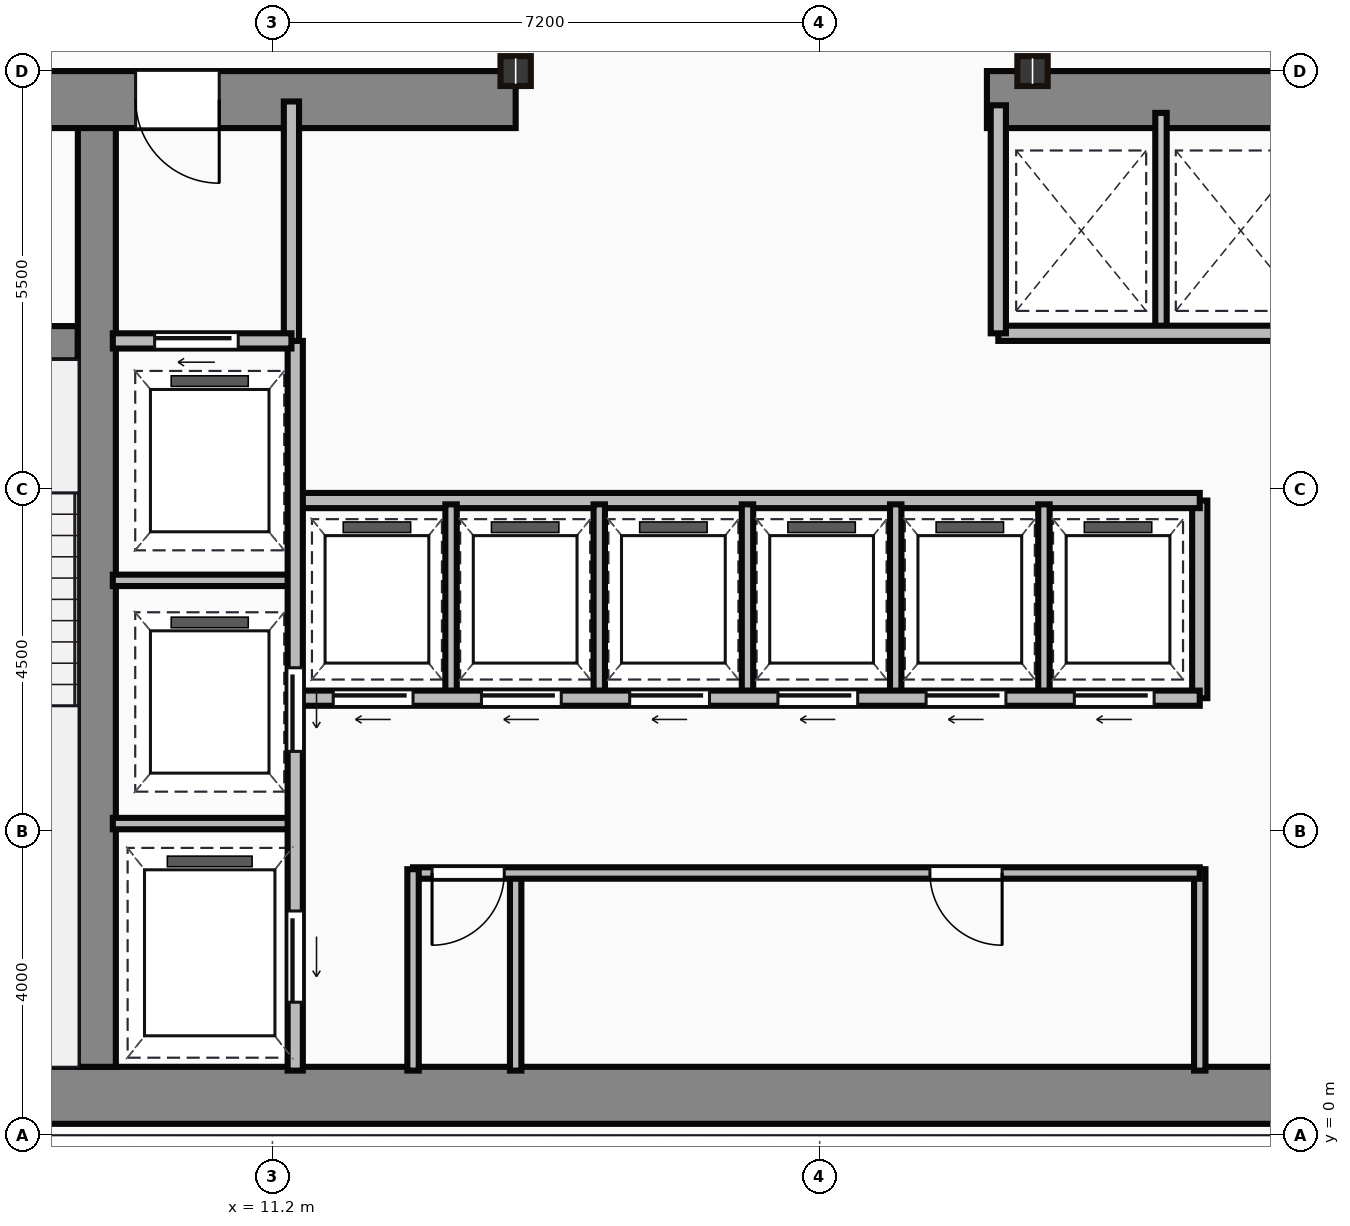
"""IFC4 building model, lengths in metres.
Left out: names, types, materials, properties, quantities, classifications, styles, units other than length and angle.
Written with IfcOpenShell. Run it as: python <this file> out.ifc"""

import sys

from ifc_helpers import new_model, si_unit, direction, frame, frame_2d, origin, origin_2d, place, context, subcontext, project, spatial, rectangle, i_section, extrude, source, transform, mapped, element, fill, save


model = new_model("IFC4")
c1 = context("Model", 3, precision=1e-05, world=origin(), true_north=direction((0.0, 1.0)))
c2 = subcontext(c1, "Body", "Model", "MODEL_VIEW")
j1 = project(units=[si_unit("LENGTHUNIT", "METRE"), si_unit("PLANEANGLEUNIT", "RADIAN")], contexts=[c1])
p1 = place(None, origin())
s1 = spatial("IfcSite", under=j1, at=p1, CompositionType="ELEMENT")
p2 = place(p1, origin())
s2 = spatial("IfcBuilding", under=s1, at=p2, CompositionType="ELEMENT")
p3 = place(p2, frame((0.0, 0.0, 103.25)))
s3 = spatial("IfcBuildingStorey", under=s2, at=p3, CompositionType="ELEMENT", Elevation=103.25)
m1 = source(origin(), c2, "Body", "SweptSolid", [
    extrude(rectangle(XDim=29.5, YDim=0.75, at=frame_2d((14.75, 0.0))), origin(), (0.0, 0.0, 1.0), 3.65),
])
p4 = place(p3, frame((4.5, 0.525, 0.0), z_axis=(0.0, 0.0, 1.0), x_axis=(1.0, 0.0, 0.0)))
e1 = element("IfcWall", 1, at=p4, inside=s3, PredefinedType="SHEAR", context=c2, shape_type="MappedRepresentation", body=[
    mapped(m1, transform((0.0, 0.0, 0.0))),
])
m2 = source(origin(), c2, "Body", "SweptSolid", [
    extrude(rectangle(XDim=9.1, YDim=0.75, at=frame_2d((4.55, 0.0))), origin(), (0.0, 0.0, 1.0), 3.65),
])
p5 = place(p3, frame((5.3, 13.625, 0.0), z_axis=(0.0, 0.0, 1.0), x_axis=(1.0, 0.0, 0.0)))
e2 = element("IfcWall", 2, at=p5, inside=s3, PredefinedType="SHEAR", context=c2, shape_type="MappedRepresentation", body=[
    mapped(m2, transform((0.0, 0.0, 0.0))),
])
p6 = place(p5, frame((4.1, 0.0, 0.0)))
e3 = element("IfcOpeningElement", 3, at=p6, cuts=e2, PredefinedType="OPENING", context=c2, shape_type="SweptSolid", body=[
    extrude(rectangle(XDim=1.1, YDim=2.15, at=frame_2d((0.55, 1.075))), frame((0.0, 0.385, 0.0), z_axis=(0.0, -1.0, 0.0), x_axis=(1.0, 0.0, 0.0)), (0.0, 0.0, 1.0), 0.77),
])
m3 = source(origin(), c2, "Body", "SweptSolid", [
    extrude(rectangle(XDim=12.6, YDim=0.75, at=frame_2d((6.3, 0.0))), origin(), (0.0, 0.0, 1.0), 3.65),
])
p7 = place(p3, frame((20.6, 13.625, 0.0), z_axis=(0.0, 0.0, 1.0), x_axis=(1.0, 0.0, 0.0)))
e4 = element("IfcWall", 4, at=p7, inside=s3, PredefinedType="SHEAR", context=c2, shape_type="MappedRepresentation", body=[
    mapped(m3, transform((0.0, 0.0, 0.0))),
])
p8 = place(p7, frame((9.25, 0.0, 0.0)))
e5 = element("IfcOpeningElement", 5, at=p8, cuts=e4, PredefinedType="OPENING", context=c2, shape_type="SweptSolid", body=[
    extrude(rectangle(XDim=1.1, YDim=2.15, at=frame_2d((0.55, 1.075))), frame((0.0, 0.385, 0.0), z_axis=(0.0, -1.0, 0.0), x_axis=(1.0, 0.0, 0.0)), (0.0, 0.0, 1.0), 0.77),
])
m4 = source(origin(), c2, "Body", "SweptSolid", [
    extrude(rectangle(XDim=12.35, YDim=0.5, at=frame_2d((6.175, 0.0))), origin(), (0.0, 0.0, 1.0), 3.65),
])
p9 = place(p3, frame((8.89, 0.9, 0.0), z_axis=(0.0, 0.0, 1.0), x_axis=(0.0, 1.0, 0.0)))
e6 = element("IfcWall", 6, at=p9, inside=s3, PredefinedType="SHEAR", context=c2, shape_type="MappedRepresentation", body=[
    mapped(m4, transform((0.0, 0.0, 0.0))),
])
m5 = source(origin(), c2, "Body", "SweptSolid", [
    extrude(rectangle(XDim=3.39, YDim=0.45, at=frame_2d((1.695, 0.0))), origin(), (0.0, 0.0, 1.0), 3.65),
])
p10 = place(p3, frame((5.25, 10.42, 0.0), z_axis=(0.0, 0.0, 1.0), x_axis=(1.0, 0.0, 0.0)))
e7 = element("IfcWall", 7, at=p10, inside=s3, PredefinedType="SHEAR", context=c2, shape_type="MappedRepresentation", body=[
    mapped(m5, transform((0.0, 0.0, 0.0))),
])
p11 = place(p10, frame((1.05, 0.0, 0.0)))
e8 = element("IfcOpeningElement", 8, at=p11, cuts=e7, PredefinedType="OPENING", context=c2, shape_type="SweptSolid", body=[
    extrude(rectangle(XDim=1.1, YDim=2.15, at=frame_2d((0.55, 1.075))), frame((0.0, 0.235, 0.0), z_axis=(0.0, -1.0, 0.0), x_axis=(1.0, 0.0, 0.0)), (0.0, 0.0, 1.0), 0.47),
])
m6 = source(origin(), c2, "Body", "SweptSolid", [
    extrude(i_section(OverallWidth=0.399, OverallDepth=0.393, WebThickness=0.023, FlangeThickness=0.037, at=origin_2d()), origin(), (0.0, 0.0, 1.0), 3.65),
])
for number, where, z_axis, x_axis in (
    (9, (14.4, 14.0, 0.0), (0.0, 0.0, 1.0), (1.0, 0.0, 0.0)),
    (10, (21.2, 14.0, 0.0), (0.0, 0.0, 1.0), (1.0, 0.0, 0.0)),
):
    element("IfcColumn", number, at=place(p3, frame(where, z_axis=z_axis, x_axis=x_axis)), inside=s3, PredefinedType="COLUMN", context=c2, shape_type="MappedRepresentation", body=[
        mapped(m6, transform((0.0, 0.0, 0.0))),
    ])
m7 = source(origin(), c2, "Body", "SweptSolid", [
    extrude(rectangle(XDim=3.18, YDim=0.2, at=frame_2d((1.59, 0.0))), origin(), (0.0, 0.0, 1.0), 3.4),
])
p12 = place(p3, frame((11.45, 10.42, 0.0), z_axis=(0.0, 0.0, 1.0), x_axis=(0.0, 1.0, 0.0)))
e11 = element("IfcWall", 11, at=p12, inside=s3, PredefinedType="PARTITIONING", context=c2, shape_type="MappedRepresentation", body=[
    mapped(m7, transform((0.0, 0.0, 0.0))),
])
m8 = source(origin(), c2, "Body", "SweptSolid", [
    extrude(rectangle(XDim=2.35, YDim=0.2, at=frame_2d((1.175, 0.0))), origin(), (0.0, 0.0, 1.0), 3.4),
])
p13 = place(p3, frame((9.1, 10.45, 0.0), z_axis=(0.0, 0.0, 1.0), x_axis=(1.0, 0.0, 0.0)))
e12 = element("IfcWall", 12, at=p13, inside=s3, PredefinedType="PARTITIONING", context=c2, shape_type="MappedRepresentation", body=[
    mapped(m8, transform((0.0, 0.0, 0.0))),
])
p14 = place(p13, frame((0.55, 0.0, 0.0)))
e13 = element("IfcOpeningElement", 13, at=p14, cuts=e12, PredefinedType="OPENING", context=c2, shape_type="SweptSolid", body=[
    extrude(rectangle(XDim=1.1, YDim=2.15, at=frame_2d((0.55, 1.075))), frame((0.0, 0.11, 0.0), z_axis=(0.0, -1.0, 0.0), x_axis=(1.0, 0.0, 0.0)), (0.0, 0.0, 1.0), 0.22),
])
m9 = source(origin(), c2, "Body", "SweptSolid", [
    extrude(rectangle(XDim=9.6, YDim=0.2, at=frame_2d((4.8, 0.0))), origin(), (0.0, 0.0, 1.0), 3.4),
])
p15 = place(p3, frame((11.5, 0.85, 0.0), z_axis=(0.0, 0.0, 1.0), x_axis=(0.0, 1.0, 0.0)))
e14 = element("IfcWall", 14, at=p15, inside=s3, PredefinedType="PARTITIONING", context=c2, shape_type="MappedRepresentation", body=[
    mapped(m9, transform((0.0, 0.0, 0.0))),
])
p16 = place(p15, frame((4.2, 0.0, 0.0)))
e15 = element("IfcOpeningElement", 15, at=p16, cuts=e14, PredefinedType="OPENING", context=c2, shape_type="SweptSolid", body=[
    extrude(rectangle(XDim=1.1, YDim=2.15, at=frame_2d((0.55, 1.075))), frame((0.0, 0.11, 0.0), z_axis=(0.0, -1.0, 0.0), x_axis=(1.0, 0.0, 0.0)), (0.0, 0.0, 1.0), 0.22),
])
p17 = place(p15, frame((0.9, 0.0, 0.0)))
e16 = element("IfcOpeningElement", 16, at=p17, cuts=e14, PredefinedType="OPENING", context=c2, shape_type="SweptSolid", body=[
    extrude(rectangle(XDim=1.2, YDim=2.15, at=frame_2d((0.6, 1.075))), frame((0.0, 0.11, 0.0), z_axis=(0.0, -1.0, 0.0), x_axis=(1.0, 0.0, 0.0)), (0.0, 0.0, 1.0), 0.22),
])
m10 = source(origin(), c2, "Body", "SweptSolid", [
    extrude(rectangle(XDim=2.4, YDim=0.15, at=frame_2d((1.2, 0.0))), origin(), (0.0, 0.0, 1.0), 3.4),
])
for number, where, z_axis, x_axis in (
    (17, (9.1, 4.1, 0.0), (0.0, 0.0, 1.0), (1.0, 0.0, 0.0)),
    (18, (9.1, 7.3, 0.0), (0.0, 0.0, 1.0), (1.0, 0.0, 0.0)),
):
    element("IfcWall", number, at=place(p3, frame(where, z_axis=z_axis, x_axis=x_axis)), inside=s3, PredefinedType="PARTITIONING", context=c2, shape_type="MappedRepresentation", body=[
        mapped(m10, transform((0.0, 0.0, 0.0))),
    ])
m11 = source(origin(), c2, "Body", "SweptSolid", [
    extrude(rectangle(XDim=2.65, YDim=0.15, at=frame_2d((1.325, 0.0))), origin(), (0.0, 0.0, 1.0), 3.4),
])
p18 = place(p3, frame((13.05, 0.85, 0.0), z_axis=(0.0, 0.0, 1.0), x_axis=(0.0, 1.0, 0.0)))
e19 = element("IfcWall", 19, at=p18, inside=s3, PredefinedType="PARTITIONING", context=c2, shape_type="MappedRepresentation", body=[
    mapped(m11, transform((0.0, 0.0, 0.0))),
])
m12 = source(origin(), c2, "Body", "SweptSolid", [
    extrude(rectangle(XDim=10.35, YDim=0.15, at=frame_2d((5.175, 0.0))), origin(), (0.0, 0.0, 1.0), 3.4),
])
p19 = place(p3, frame((13.05, 3.45, 0.0), z_axis=(0.0, 0.0, 1.0), x_axis=(1.0, 0.0, 0.0)))
e20 = element("IfcWall", 20, at=p19, inside=s3, PredefinedType="PARTITIONING", context=c2, shape_type="MappedRepresentation", body=[
    mapped(m12, transform((0.0, 0.0, 0.0))),
])
p20 = place(p19, frame((0.25, 0.0, 0.0)))
e21 = element("IfcOpeningElement", 21, at=p20, cuts=e20, PredefinedType="OPENING", context=c2, shape_type="SweptSolid", body=[
    extrude(rectangle(XDim=0.95, YDim=2.15, at=frame_2d((0.475, 1.075))), frame((0.0, 0.085, 0.0), z_axis=(0.0, -1.0, 0.0), x_axis=(1.0, 0.0, 0.0)), (0.0, 0.0, 1.0), 0.17),
])
p21 = place(p19, frame((6.8, 0.0, 0.0)))
e22 = element("IfcOpeningElement", 22, at=p21, cuts=e20, PredefinedType="OPENING", context=c2, shape_type="SweptSolid", body=[
    extrude(rectangle(XDim=0.95, YDim=2.15, at=frame_2d((0.475, 1.075))), frame((0.0, 0.085, 0.0), z_axis=(0.0, -1.0, 0.0), x_axis=(1.0, 0.0, 0.0)), (0.0, 0.0, 1.0), 0.17),
])
p22 = place(p3, frame((23.4, 0.85, 0.0), z_axis=(0.0, 0.0, 1.0), x_axis=(0.0, 1.0, 0.0)))
e23 = element("IfcWall", 23, at=p22, inside=s3, PredefinedType="PARTITIONING", context=c2, shape_type="MappedRepresentation", body=[
    mapped(m11, transform((0.0, 0.0, 0.0))),
])
m13 = source(origin(), c2, "Body", "SweptSolid", [
    extrude(rectangle(XDim=2.6, YDim=0.15, at=frame_2d((1.3, 0.0))), origin(), (0.0, 0.0, 1.0), 3.4),
])
p23 = place(p3, frame((14.4, 0.85, 0.0), z_axis=(0.0, 0.0, 1.0), x_axis=(0.0, 1.0, 0.0)))
e24 = element("IfcWall", 24, at=p23, inside=s3, PredefinedType="PARTITIONING", context=c2, shape_type="MappedRepresentation", body=[
    mapped(m13, transform((0.0, 0.0, 0.0))),
])
m14 = source(origin(), c2, "Body", "SweptSolid", [
    extrude(rectangle(XDim=11.85, YDim=0.2, at=frame_2d((5.925, 0.0))), origin(), (0.0, 0.0, 1.0), 3.4),
])
p24 = place(p3, frame((11.55, 5.75, 0.0), z_axis=(0.0, 0.0, 1.0), x_axis=(1.0, 0.0, 0.0)))
e25 = element("IfcWall", 25, at=p24, inside=s3, PredefinedType="PARTITIONING", context=c2, shape_type="MappedRepresentation", body=[
    mapped(m14, transform((0.0, 0.0, 0.0))),
])
p25 = place(p24, frame((0.45, 0.0, 0.0)))
e26 = element("IfcOpeningElement", 26, at=p25, cuts=e25, PredefinedType="OPENING", context=c2, shape_type="SweptSolid", body=[
    extrude(rectangle(XDim=1.05, YDim=2.15, at=frame_2d((0.525, 1.075))), frame((0.0, 0.11, 0.0), z_axis=(0.0, -1.0, 0.0), x_axis=(1.0, 0.0, 0.0)), (0.0, 0.0, 1.0), 0.22),
])
p26 = place(p24, frame((2.4, 0.0, 0.0)))
e27 = element("IfcOpeningElement", 27, at=p26, cuts=e25, PredefinedType="OPENING", context=c2, shape_type="SweptSolid", body=[
    extrude(rectangle(XDim=1.05, YDim=2.15, at=frame_2d((0.525, 1.075))), frame((0.0, 0.11, 0.0), z_axis=(0.0, -1.0, 0.0), x_axis=(1.0, 0.0, 0.0)), (0.0, 0.0, 1.0), 0.22),
])
p27 = place(p24, frame((4.35, 0.0, 0.0)))
e28 = element("IfcOpeningElement", 28, at=p27, cuts=e25, PredefinedType="OPENING", context=c2, shape_type="SweptSolid", body=[
    extrude(rectangle(XDim=1.05, YDim=2.15, at=frame_2d((0.525, 1.075))), frame((0.0, 0.11, 0.0), z_axis=(0.0, -1.0, 0.0), x_axis=(1.0, 0.0, 0.0)), (0.0, 0.0, 1.0), 0.22),
])
p28 = place(p24, frame((6.3, 0.0, 0.0)))
e29 = element("IfcOpeningElement", 29, at=p28, cuts=e25, PredefinedType="OPENING", context=c2, shape_type="SweptSolid", body=[
    extrude(rectangle(XDim=1.05, YDim=2.15, at=frame_2d((0.525, 1.075))), frame((0.0, 0.11, 0.0), z_axis=(0.0, -1.0, 0.0), x_axis=(1.0, 0.0, 0.0)), (0.0, 0.0, 1.0), 0.22),
])
p29 = place(p24, frame((8.25, 0.0, 0.0)))
e30 = element("IfcOpeningElement", 30, at=p29, cuts=e25, PredefinedType="OPENING", context=c2, shape_type="SweptSolid", body=[
    extrude(rectangle(XDim=1.05, YDim=2.15, at=frame_2d((0.525, 1.075))), frame((0.0, 0.11, 0.0), z_axis=(0.0, -1.0, 0.0), x_axis=(1.0, 0.0, 0.0)), (0.0, 0.0, 1.0), 0.22),
])
p30 = place(p24, frame((10.2, 0.0, 0.0)))
e31 = element("IfcOpeningElement", 31, at=p30, cuts=e25, PredefinedType="OPENING", context=c2, shape_type="SweptSolid", body=[
    extrude(rectangle(XDim=1.05, YDim=2.15, at=frame_2d((0.525, 1.075))), frame((0.0, 0.11, 0.0), z_axis=(0.0, -1.0, 0.0), x_axis=(1.0, 0.0, 0.0)), (0.0, 0.0, 1.0), 0.22),
])
p31 = place(p3, frame((11.55, 8.35, 0.0), z_axis=(0.0, 0.0, 1.0), x_axis=(1.0, 0.0, 0.0)))
e32 = element("IfcWall", 32, at=p31, inside=s3, PredefinedType="PARTITIONING", context=c2, shape_type="MappedRepresentation", body=[
    mapped(m14, transform((0.0, 0.0, 0.0))),
])
m15 = source(origin(), c2, "Body", "SweptSolid", [
    extrude(rectangle(XDim=2.6, YDim=0.2, at=frame_2d((1.3, 0.0))), origin(), (0.0, 0.0, 1.0), 3.4),
])
p32 = place(p3, frame((23.4, 5.75, 0.0), z_axis=(0.0, 0.0, 1.0), x_axis=(0.0, 1.0, 0.0)))
e33 = element("IfcWall", 33, at=p32, inside=s3, PredefinedType="PARTITIONING", context=c2, shape_type="MappedRepresentation", body=[
    mapped(m15, transform((0.0, 0.0, 0.0))),
])
m16 = source(origin(), c2, "Body", "SweptSolid", [
    extrude(rectangle(XDim=2.5, YDim=0.15, at=frame_2d((1.25, 0.0))), origin(), (0.0, 0.0, 1.0), 3.4),
])
for number, where, z_axis, x_axis in (
    (34, (13.55, 5.8, 0.0), (0.0, 0.0, 1.0), (0.0, 1.0, 0.0)),
    (35, (15.5, 5.8, 0.0), (0.0, 0.0, 1.0), (0.0, 1.0, 0.0)),
    (36, (17.45, 5.8, 0.0), (0.0, 0.0, 1.0), (0.0, 1.0, 0.0)),
    (37, (19.4, 5.8, 0.0), (0.0, 0.0, 1.0), (0.0, 1.0, 0.0)),
    (38, (21.35, 5.8, 0.0), (0.0, 0.0, 1.0), (0.0, 1.0, 0.0)),
):
    element("IfcWall", number, at=place(p3, frame(where, z_axis=z_axis, x_axis=x_axis)), inside=s3, PredefinedType="PARTITIONING", context=c2, shape_type="MappedRepresentation", body=[
        mapped(m16, transform((0.0, 0.0, 0.0))),
    ])
m17 = source(origin(), c2, "Body", "SweptSolid", [
    extrude(rectangle(XDim=8.8, YDim=0.2, at=frame_2d((4.4, 0.0))), origin(), (0.0, 0.0, 1.0), 3.4),
])
p33 = place(p3, frame((20.75, 10.55, 0.0), z_axis=(0.0, 0.0, 1.0), x_axis=(1.0, 0.0, 0.0)))
e39 = element("IfcWall", 39, at=p33, inside=s3, PredefinedType="PARTITIONING", context=c2, shape_type="MappedRepresentation", body=[
    mapped(m17, transform((0.0, 0.0, 0.0))),
])
m18 = source(origin(), c2, "Body", "SweptSolid", [
    extrude(rectangle(XDim=3.0, YDim=0.2, at=frame_2d((1.5, 0.0))), origin(), (0.0, 0.0, 1.0), 3.4),
])
p34 = place(p3, frame((20.75, 10.55, 0.0), z_axis=(0.0, 0.0, 1.0), x_axis=(0.0, 1.0, 0.0)))
e40 = element("IfcWall", 40, at=p34, inside=s3, PredefinedType="PARTITIONING", context=c2, shape_type="MappedRepresentation", body=[
    mapped(m18, transform((0.0, 0.0, 0.0))),
])
m19 = source(origin(), c2, "Body", "SweptSolid", [
    extrude(rectangle(XDim=2.85, YDim=0.15, at=frame_2d((1.425, 0.0))), origin(), (0.0, 0.0, 1.0), 3.4),
])
p35 = place(p3, frame((22.89, 10.6, 0.0), z_axis=(0.0, 0.0, 1.0), x_axis=(0.0, 1.0, 0.0)))
e41 = element("IfcWall", 41, at=p35, inside=s3, PredefinedType="PARTITIONING", context=c2, shape_type="MappedRepresentation", body=[
    mapped(m19, transform((0.0, 0.0, 0.0))),
])
m20 = source(origin(), c2, "Body", "SweptSolid", [
    extrude(rectangle(XDim=1.1, YDim=2.15, at=frame_2d((0.55, 1.075))), frame((0.0, 0.025, 0.0), z_axis=(0.0, -1.0, 0.0), x_axis=(1.0, 0.0, 0.0)), (0.0, 0.0, 1.0), 0.05),
])
p36 = place(p6, origin())
e42 = element("IfcDoor", 42, at=p36, inside=s3, OperationType="SINGLE_SWING_RIGHT", PredefinedType="DOOR", context=c2, shape_type="MappedRepresentation", body=[
    mapped(m20, transform((0.0, 0.0, 0.0))),
])
fill(e3, e42)
p37 = place(p14, origin())
e43 = element("IfcDoor", 43, at=p37, inside=s3, OperationType="SLIDING_TO_LEFT", PredefinedType="DOOR", context=c2, shape_type="MappedRepresentation", body=[
    mapped(m20, transform((0.0, 0.0, 0.0))),
])
fill(e13, e43)
p38 = place(p16, frame((1.1, 0.0, 0.0), z_axis=(0.0, 0.0, 1.0), x_axis=(-1.0, 0.0, 0.0)))
e44 = element("IfcDoor", 44, at=p38, inside=s3, OperationType="SLIDING_TO_LEFT", PredefinedType="DOOR", context=c2, shape_type="MappedRepresentation", body=[
    mapped(m20, transform((0.0, 0.0, 0.0))),
])
fill(e15, e44)
m21 = source(origin(), c2, "Body", "SweptSolid", [
    extrude(rectangle(XDim=1.2, YDim=2.15, at=frame_2d((0.6, 1.075))), frame((0.0, 0.025, 0.0), z_axis=(0.0, -1.0, 0.0), x_axis=(1.0, 0.0, 0.0)), (0.0, 0.0, 1.0), 0.05),
])
p39 = place(p17, frame((1.2, 0.0, 0.0), z_axis=(0.0, 0.0, 1.0), x_axis=(-1.0, 0.0, 0.0)))
e45 = element("IfcDoor", 45, at=p39, inside=s3, OperationType="SLIDING_TO_LEFT", PredefinedType="DOOR", context=c2, shape_type="MappedRepresentation", body=[
    mapped(m21, transform((0.0, 0.0, 0.0))),
])
fill(e16, e45)
m22 = source(origin(), c2, "Body", "SweptSolid", [
    extrude(rectangle(XDim=0.95, YDim=2.15, at=frame_2d((0.475, 1.075))), frame((0.0, 0.025, 0.0), z_axis=(0.0, -1.0, 0.0), x_axis=(1.0, 0.0, 0.0)), (0.0, 0.0, 1.0), 0.05),
])
p40 = place(p20, origin())
e46 = element("IfcDoor", 46, at=p40, inside=s3, OperationType="SINGLE_SWING_LEFT", PredefinedType="DOOR", context=c2, shape_type="MappedRepresentation", body=[
    mapped(m22, transform((0.0, 0.0, 0.0))),
])
fill(e21, e46)
p41 = place(p21, origin())
e47 = element("IfcDoor", 47, at=p41, inside=s3, OperationType="SINGLE_SWING_RIGHT", PredefinedType="DOOR", context=c2, shape_type="MappedRepresentation", body=[
    mapped(m22, transform((0.0, 0.0, 0.0))),
])
fill(e22, e47)
m23 = source(origin(), c2, "Body", "SweptSolid", [
    extrude(rectangle(XDim=1.05, YDim=2.15, at=frame_2d((0.525, 1.075))), frame((0.0, 0.025, 0.0), z_axis=(0.0, -1.0, 0.0), x_axis=(1.0, 0.0, 0.0)), (0.0, 0.0, 1.0), 0.05),
])
p42 = place(p25, frame((1.05, 0.0, 0.0), z_axis=(0.0, 0.0, 1.0), x_axis=(-1.0, 0.0, 0.0)))
e48 = element("IfcDoor", 48, at=p42, inside=s3, OperationType="SLIDING_TO_LEFT", PredefinedType="DOOR", context=c2, shape_type="MappedRepresentation", body=[
    mapped(m23, transform((0.0, 0.0, 0.0))),
])
fill(e26, e48)
p43 = place(p26, frame((1.05, 0.0, 0.0), z_axis=(0.0, 0.0, 1.0), x_axis=(-1.0, 0.0, 0.0)))
e49 = element("IfcDoor", 49, at=p43, inside=s3, OperationType="SLIDING_TO_LEFT", PredefinedType="DOOR", context=c2, shape_type="MappedRepresentation", body=[
    mapped(m23, transform((0.0, 0.0, 0.0))),
])
fill(e27, e49)
p44 = place(p27, frame((1.05, 0.0, 0.0), z_axis=(0.0, 0.0, 1.0), x_axis=(-1.0, 0.0, 0.0)))
e50 = element("IfcDoor", 50, at=p44, inside=s3, OperationType="SLIDING_TO_LEFT", PredefinedType="DOOR", context=c2, shape_type="MappedRepresentation", body=[
    mapped(m23, transform((0.0, 0.0, 0.0))),
])
fill(e28, e50)
p45 = place(p28, frame((1.05, 0.0, 0.0), z_axis=(0.0, 0.0, 1.0), x_axis=(-1.0, 0.0, 0.0)))
e51 = element("IfcDoor", 51, at=p45, inside=s3, OperationType="SLIDING_TO_LEFT", PredefinedType="DOOR", context=c2, shape_type="MappedRepresentation", body=[
    mapped(m23, transform((0.0, 0.0, 0.0))),
])
fill(e29, e51)
p46 = place(p29, frame((1.05, 0.0, 0.0), z_axis=(0.0, 0.0, 1.0), x_axis=(-1.0, 0.0, 0.0)))
e52 = element("IfcDoor", 52, at=p46, inside=s3, OperationType="SLIDING_TO_LEFT", PredefinedType="DOOR", context=c2, shape_type="MappedRepresentation", body=[
    mapped(m23, transform((0.0, 0.0, 0.0))),
])
fill(e30, e52)
p47 = place(p30, frame((1.05, 0.0, 0.0), z_axis=(0.0, 0.0, 1.0), x_axis=(-1.0, 0.0, 0.0)))
e53 = element("IfcDoor", 53, at=p47, inside=s3, OperationType="SLIDING_TO_LEFT", PredefinedType="DOOR", context=c2, shape_type="MappedRepresentation", body=[
    mapped(m23, transform((0.0, 0.0, 0.0))),
])
fill(e31, e53)
save(model, sys.argv[1])
